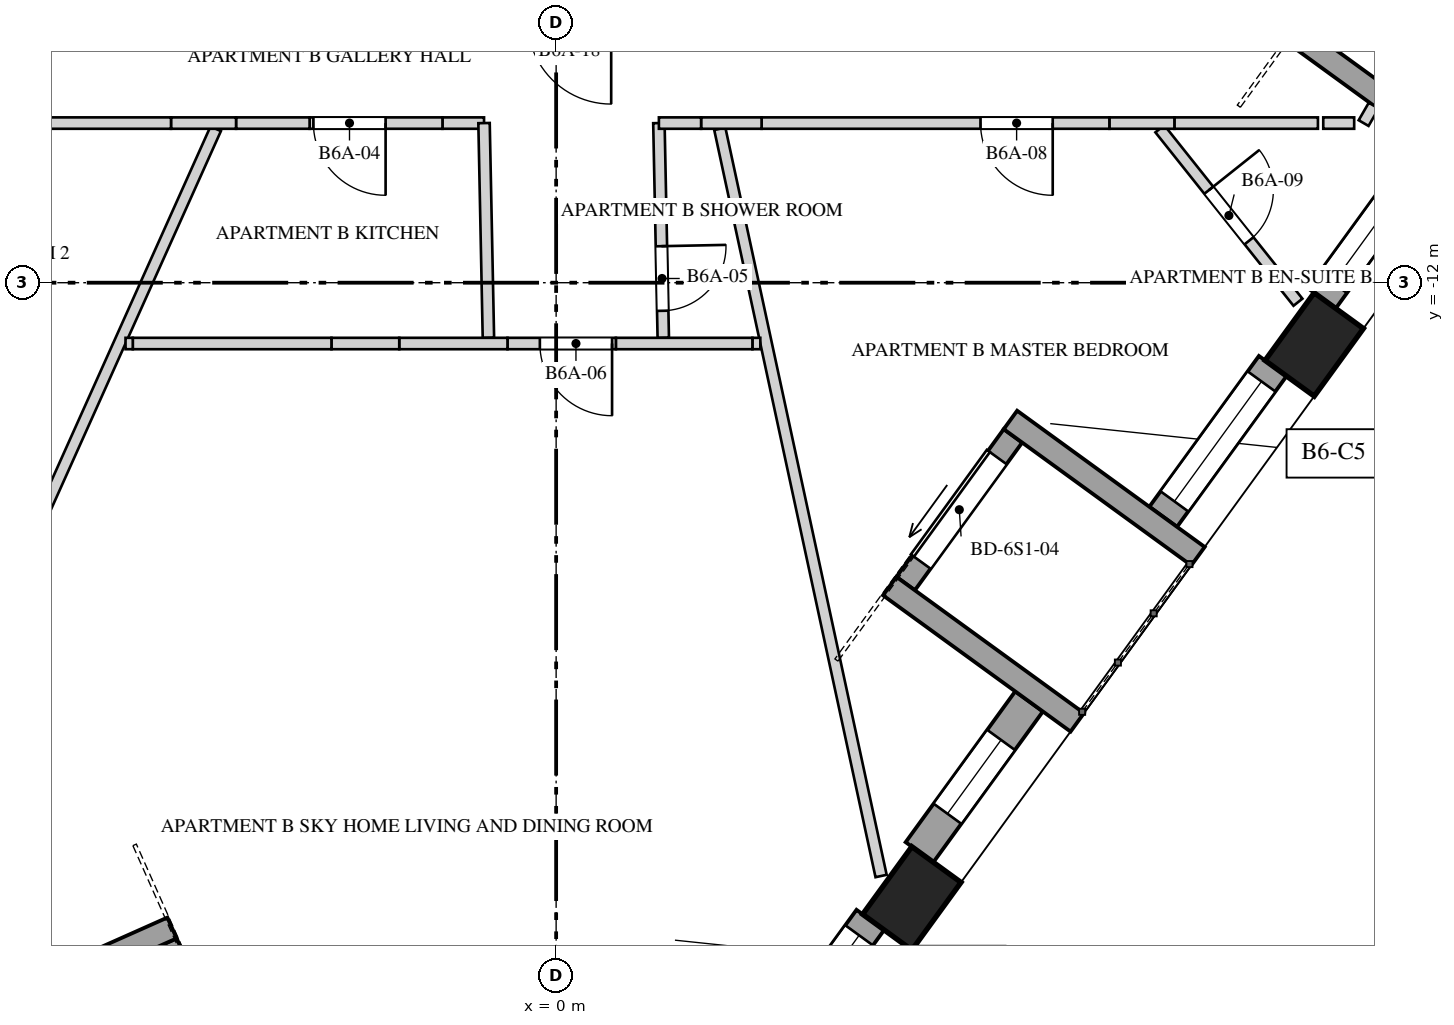
"""IFC4 building model, lengths in metres.
Left out: names, types, materials, properties, quantities, classifications, styles, units other than length and angle.
Written with IfcOpenShell. Run it as: python <this file> out.ifc"""

import sys

from ifc_helpers import new_model, si_unit, direction, frame, frame_2d, origin, origin_2d, place, context, subcontext, project, spatial, polyline, rectangle, outline, extrude, element, fill, save


model = new_model("IFC4")
c1 = context("Model", 3, precision=1e-05, world=origin(), true_north=direction((0.0, 1.0)))
c2 = subcontext(c1, "Body", "Model", "MODEL_VIEW")
j1 = project(units=[si_unit("LENGTHUNIT", "METRE"), si_unit("PLANEANGLEUNIT", "RADIAN")], contexts=[c1])
p1 = place(None, origin())
s1 = spatial("IfcSite", under=j1, at=p1, CompositionType="ELEMENT")
p2 = place(p1, origin())
s2 = spatial("IfcBuilding", under=s1, at=p2, CompositionType="ELEMENT")
p3 = place(p2, frame((0.0, 0.0, 241.2)))
s3 = spatial("IfcBuildingStorey", under=s2, at=p3, CompositionType="ELEMENT", Elevation=241.2)
for number, where, z_axis, x_axis in (
    (1, (4.68, -20.099, 0.0), (0.0, 0.0, 1.0), (0.588, 0.809, 0.0)),
    (2, (9.974, -12.813, 0.0), (0.0, 0.0, 1.0), (0.588, 0.809, 0.0)),
):
    element("IfcColumn", number, at=place(p3, frame(where, z_axis=z_axis, x_axis=x_axis)), inside=s3, PredefinedType="COLUMN", context=c2, shape_type="SweptSolid", body=[
        extrude(rectangle(XDim=1.1, YDim=0.8, at=origin_2d()), origin(), (0.0, 0.0, 1.0), 4.0),
    ])
p4 = place(p3, frame((-0.131, -26.253, 0.0), z_axis=(0.0, 0.0, 1.0), x_axis=(0.587781549195, 0.80901968482, 0.0)))
e3 = element("IfcWall", 3, at=p4, inside=s3, PredefinedType="SOLIDWALL", context=c2, shape_type="SweptSolid", body=[
    extrude(rectangle(XDim=7.257, YDim=0.45, at=frame_2d((3.628, 0.0))), origin(), (0.0, 0.0, 1.0), 3.3),
])
p5 = place(p4, frame((0.301, 0.0, 0.4)))
e4 = element("IfcOpeningElement", 4, at=p5, cuts=e3, PredefinedType="OPENING", context=c2, shape_type="SweptSolid", body=[
    extrude(rectangle(XDim=1.2, YDim=2.1, at=frame_2d((0.6, 1.05))), frame((0.0, 0.235, 0.0), z_axis=(0.0, -1.0, 0.0), x_axis=(1.0, 0.0, 0.0)), (0.0, 0.0, 1.0), 0.47),
])
p6 = place(p4, frame((2.328, 0.0, 0.4)))
e5 = element("IfcOpeningElement", 5, at=p6, cuts=e3, PredefinedType="OPENING", context=c2, shape_type="SweptSolid", body=[
    extrude(rectangle(XDim=1.95, YDim=2.75, at=frame_2d((0.975, 1.375))), frame((0.0, 0.235, 0.0), z_axis=(0.0, -1.0, 0.0), x_axis=(1.0, 0.0, 0.0)), (0.0, 0.0, 1.0), 0.47),
])
p7 = place(p4, frame((5.056, 0.0, 0.4)))
e6 = element("IfcOpeningElement", 6, at=p7, cuts=e3, PredefinedType="OPENING", context=c2, shape_type="SweptSolid", body=[
    extrude(rectangle(XDim=1.95, YDim=2.75, at=frame_2d((0.975, 1.375))), frame((0.0, 0.235, 0.0), z_axis=(0.0, -1.0, 0.0), x_axis=(1.0, 0.0, 0.0)), (0.0, 0.0, 1.0), 0.47),
])
p8 = place(p3, frame((4.781, -19.493, 0.0), z_axis=(0.0, 0.0, 1.0), x_axis=(0.587792773076, 0.809011530152, 0.0)))
e7 = element("IfcWall", 7, at=p8, inside=s3, PredefinedType="SOLIDWALL", context=c2, shape_type="SweptSolid", body=[
    extrude(rectangle(XDim=2.452, YDim=0.45, at=frame_2d((1.226, 0.0))), origin(), (0.0, 0.0, 1.0), 3.3),
])
p9 = place(p8, frame((0.626, 0.0, 0.4)))
e8 = element("IfcOpeningElement", 8, at=p9, cuts=e7, PredefinedType="OPENING", context=c2, shape_type="SweptSolid", body=[
    extrude(rectangle(XDim=1.2, YDim=2.75, at=frame_2d((0.6, 1.375))), frame((0.0, 0.235, 0.0), z_axis=(0.0, -1.0, 0.0), x_axis=(1.0, 0.0, 0.0)), (0.0, 0.0, 1.0), 0.47),
])
p10 = place(p3, frame((7.987, -15.08, 0.0), z_axis=(0.0, 0.0, 1.0), x_axis=(0.587792773076, 0.809011530152, 0.0)))
e9 = element("IfcWall", 9, at=p10, inside=s3, PredefinedType="SOLIDWALL", context=c2, shape_type="SweptSolid", body=[
    extrude(rectangle(XDim=2.452, YDim=0.45, at=frame_2d((1.226, 0.0))), origin(), (0.0, 0.0, 1.0), 3.3),
])
p11 = place(p10, frame((0.251, 0.0, 0.4)))
e10 = element("IfcOpeningElement", 10, at=p11, cuts=e9, PredefinedType="OPENING", context=c2, shape_type="SweptSolid", body=[
    extrude(rectangle(XDim=1.95, YDim=2.75, at=frame_2d((0.975, 1.375))), frame((0.0, 0.235, 0.0), z_axis=(0.0, -1.0, 0.0), x_axis=(1.0, 0.0, 0.0)), (0.0, 0.0, 1.0), 0.47),
])
p12 = place(p3, frame((10.074, -12.206, 0.0), z_axis=(0.0, 0.0, 1.0), x_axis=(0.587792773076, 0.809011530152, 0.0)))
e11 = element("IfcWall", 11, at=p12, inside=s3, PredefinedType="SOLIDWALL", context=c2, shape_type="SweptSolid", body=[
    extrude(rectangle(XDim=2.452, YDim=0.45, at=frame_2d((1.226, 0.0))), origin(), (0.0, 0.0, 1.0), 3.3),
])
p13 = place(p12, frame((0.251, 0.0, 0.4)))
e12 = element("IfcOpeningElement", 12, at=p13, cuts=e11, PredefinedType="OPENING", context=c2, shape_type="SweptSolid", body=[
    extrude(rectangle(XDim=1.95, YDim=2.75, at=frame_2d((0.975, 1.375))), frame((0.0, 0.235, 0.0), z_axis=(0.0, -1.0, 0.0), x_axis=(1.0, 0.0, 0.0)), (0.0, 0.0, 1.0), 0.47),
])
p14 = place(p3, frame((-5.129, -20.687, 0.0), z_axis=(0.0, 0.0, 1.0), x_axis=(0.406723017018, -0.913551524232, 0.0)))
e13 = element("IfcWall", 13, at=p14, inside=s3, PredefinedType="SOLIDWALL", context=c2, shape_type="SweptSolid", body=[
    extrude(rectangle(XDim=2.402, YDim=0.3, at=frame_2d((1.201, 0.0))), origin(), (0.0, 0.0, 1.0), 3.3),
])
p15 = place(p14, frame((0.351, 0.0, 0.0)))
e14 = element("IfcOpeningElement", 14, at=p15, cuts=e13, PredefinedType="OPENING", context=c2, shape_type="SweptSolid", body=[
    extrude(rectangle(XDim=1.7, YDim=2.5, at=frame_2d((0.85, 1.25))), frame((0.0, 0.16, 0.0), z_axis=(0.0, -1.0, 0.0), x_axis=(1.0, 0.0, 0.0)), (0.0, 0.0, 1.0), 0.32),
])
p16 = place(p3, frame((-7.84, -21.729, 0.0), z_axis=(0.0, 0.0, 1.0), x_axis=(0.913557205168, 0.406710256677, 0.0)))
e15 = element("IfcWall", 15, at=p16, inside=s3, PredefinedType="SOLIDWALL", context=c2, shape_type="SweptSolid", body=[
    extrude(rectangle(XDim=3.05, YDim=0.3, at=frame_2d((1.525, 0.0))), origin(), (0.0, 0.0, 1.0), 3.3),
])
p17 = place(p3, frame((4.598, -15.958, 0.0), z_axis=(0.0, 0.0, 1.0), x_axis=(0.587833242688, 0.808982125137, 0.0)))
e16 = element("IfcWall", 16, at=p17, inside=s3, PredefinedType="SOLIDWALL", context=c2, shape_type="SweptSolid", body=[
    extrude(rectangle(XDim=2.402, YDim=0.3, at=frame_2d((1.201, 0.0))), origin(), (0.0, 0.0, 1.0), 3.3),
])
p18 = place(p17, frame((0.351, 0.0, 0.0)))
e17 = element("IfcOpeningElement", 17, at=p18, cuts=e16, PredefinedType="OPENING", context=c2, shape_type="SweptSolid", body=[
    extrude(rectangle(XDim=1.7, YDim=2.5, at=frame_2d((0.85, 1.25))), frame((0.0, 0.16, 0.0), z_axis=(0.0, -1.0, 0.0), x_axis=(1.0, 0.0, 0.0)), (0.0, 0.0, 1.0), 0.32),
])
for number, where, z_axis, x_axis in (
    (18, (6.856, -17.784, 0.0), (0.0, 0.0, 1.0), (-0.809, 0.588, 0.0)),
    (19, (8.444, -15.598, 0.0), (0.0, 0.0, 1.0), (-0.809, 0.588, 0.0)),
    (20, (12.15, -10.498, 0.0), (0.0, 0.0, 1.0), (-0.809, 0.588, 0.0)),
):
    element("IfcWall", number, at=place(p3, frame(where, z_axis=z_axis, x_axis=x_axis)), inside=s3, PredefinedType="SOLIDWALL", context=c2, shape_type="SweptSolid", body=[
        extrude(rectangle(XDim=3.05, YDim=0.3, at=frame_2d((1.525, 0.0))), origin(), (0.0, 0.0, 1.0), 3.3),
    ])
p19 = place(p3, frame((-8.3, -18.484, 0.0), z_axis=(0.0, 0.0, 1.0), x_axis=(0.409625524412, 0.9122537639, 0.0)))
e21 = element("IfcWall", 21, at=p19, inside=s3, PredefinedType="PARTITIONING", context=c2, shape_type="SweptSolid", body=[
    extrude(rectangle(XDim=9.327, YDim=0.15, at=frame_2d((4.664, 0.0))), origin(), (0.0, 0.0, 1.0), 2.75),
])
p20 = place(p3, frame((-0.948, -9.9, 0.0), z_axis=(0.0, 0.0, 1.0), x_axis=(-1.0, 0.0, 0.0)))
e22 = element("IfcWall", 22, at=p20, inside=s3, PredefinedType="PARTITIONING", context=c2, shape_type="SweptSolid", body=[
    extrude(rectangle(XDim=0.547, YDim=0.15, at=frame_2d((0.273, 0.0))), origin(), (0.0, 0.0, 1.0), 3.65),
])
p21 = place(p3, frame((-1.495, -9.9, 0.0), z_axis=(0.0, 0.0, 1.0), x_axis=(-1.0, 0.0, 0.0)))
e23 = element("IfcWall", 23, at=p21, inside=s3, PredefinedType="PARTITIONING", context=c2, shape_type="SweptSolid", body=[
    extrude(outline(polyline([(0.0, 0.0), (1.748, 0.0), (1.748, 3.65), (0.892, 3.65), (0.892, 2.55), (0.0, 2.55), (0.0, 0.0)])), frame((0.0, 0.075, 0.0), z_axis=(0.0, -1.0, 0.0), x_axis=(1.0, 0.0, 0.0)), (0.0, 0.0, 1.0), 0.15),
])
p22 = place(p21, frame((0.748, 0.0, 0.0)))
e24 = element("IfcOpeningElement", 24, at=p22, cuts=e23, PredefinedType="OPENING", context=c2, shape_type="SweptSolid", body=[
    extrude(rectangle(XDim=0.95, YDim=2.4, at=frame_2d((0.475, 1.2))), frame((0.0, 0.085, 0.0), z_axis=(0.0, -1.0, 0.0), x_axis=(1.0, 0.0, 0.0)), (0.0, 0.0, 1.0), 0.17),
])
p23 = place(p3, frame((-3.244, -9.9, 0.0), z_axis=(0.0, 0.0, 1.0), x_axis=(-1.0, 0.0, 0.0)))
e25 = element("IfcWall", 25, at=p23, inside=s3, PredefinedType="PARTITIONING", context=c2, shape_type="SweptSolid", body=[
    extrude(rectangle(XDim=0.967, YDim=0.15, at=frame_2d((0.484, 0.0))), origin(), (0.0, 0.0, 1.0), 3.65),
])
p24 = place(p3, frame((-4.211, -9.9, 0.0), z_axis=(0.0, 0.0, 1.0), x_axis=(-1.0, 0.0, 0.0)))
e26 = element("IfcWall", 26, at=p24, inside=s3, PredefinedType="PARTITIONING", context=c2, shape_type="SweptSolid", body=[
    extrude(rectangle(XDim=0.856, YDim=0.15, at=frame_2d((0.428, 0.0))), origin(), (0.0, 0.0, 1.0), 2.75),
])
p25 = place(p3, frame((-5.067, -9.9, 0.0), z_axis=(0.0, 0.0, 1.0), x_axis=(-1.0, 0.0, 0.0)))
e27 = element("IfcWall", 27, at=p25, inside=s3, PredefinedType="PARTITIONING", context=c2, shape_type="SweptSolid", body=[
    extrude(rectangle(XDim=5.556, YDim=0.15, at=frame_2d((2.778, 0.0))), origin(), (0.0, 0.0, 1.0), 3.65),
])
p26 = place(p25, frame((1.971, 0.0, 0.0)))
e28 = element("IfcOpeningElement", 28, at=p26, cuts=e27, PredefinedType="OPENING", context=c2, shape_type="SweptSolid", body=[
    extrude(rectangle(XDim=0.95, YDim=2.4, at=frame_2d((0.475, 1.2))), frame((0.0, 0.085, 0.0), z_axis=(0.0, -1.0, 0.0), x_axis=(1.0, 0.0, 0.0)), (0.0, 0.0, 1.0), 0.17),
])
p27 = place(p3, frame((-0.891, -12.725, 0.0), z_axis=(0.0, 0.0, 1.0), x_axis=(-0.020389814815, 0.999792106116, 0.0)))
e29 = element("IfcWall", 29, at=p27, inside=s3, PredefinedType="PARTITIONING", context=c2, shape_type="SweptSolid", body=[
    extrude(rectangle(XDim=2.826, YDim=0.15, at=frame_2d((1.413, 0.0))), origin(), (0.0, 0.0, 1.0), 3.65),
])
p28 = place(p3, frame((1.352, -9.9, 0.0), z_axis=(0.0, 0.0, 1.0), x_axis=(0.020303452986, -0.999793863652, 0.0)))
e30 = element("IfcWall", 30, at=p28, inside=s3, PredefinedType="PARTITIONING", context=c2, shape_type="SweptSolid", body=[
    extrude(rectangle(XDim=2.826, YDim=0.15, at=frame_2d((1.413, 0.0))), origin(), (0.0, 0.0, 1.0), 3.65),
])
p29 = place(p28, frame((1.62, 0.0, 0.0)))
e31 = element("IfcOpeningElement", 31, at=p29, cuts=e30, PredefinedType="OPENING", context=c2, shape_type="SweptSolid", body=[
    extrude(rectangle(XDim=0.85, YDim=2.4, at=frame_2d((0.425, 1.2))), frame((0.0, 0.085, 0.0), z_axis=(0.0, -1.0, 0.0), x_axis=(1.0, 0.0, 0.0)), (0.0, 0.0, 1.0), 0.17),
])
p30 = place(p3, frame((2.153, -9.975, 0.0), z_axis=(0.0, 0.0, 1.0), x_axis=(0.210986150263, -0.977489050781, 0.0)))
e32 = element("IfcWall", 32, at=p30, inside=s3, PredefinedType="PARTITIONING", context=c2, shape_type="SweptSolid", body=[
    extrude(rectangle(XDim=10.057, YDim=0.15, at=frame_2d((5.028, 0.0))), origin(), (0.0, 0.0, 1.0), 2.75),
])
p31 = place(p3, frame((2.686, -12.8, 0.0), z_axis=(0.0, 0.0, 1.0), x_axis=(-1.0, 0.0, 0.0)))
e33 = element("IfcWall", 33, at=p31, inside=s3, PredefinedType="PARTITIONING", context=c2, shape_type="SweptSolid", body=[
    extrude(rectangle(XDim=0.104, YDim=0.15, at=frame_2d((0.052, 0.0))), origin(), (0.0, 0.0, 1.0), 2.75),
])
p32 = place(p3, frame((2.582, -12.8, 0.0), z_axis=(0.0, 0.0, 1.0), x_axis=(-1.0, 0.0, 0.0)))
e34 = element("IfcWall", 34, at=p32, inside=s3, PredefinedType="PARTITIONING", context=c2, shape_type="SweptSolid", body=[
    extrude(rectangle(XDim=1.796, YDim=0.15, at=frame_2d((0.898, 0.0))), origin(), (0.0, 0.0, 1.0), 3.65),
])
p33 = place(p3, frame((0.786, -12.8, 0.0), z_axis=(0.0, 0.0, 1.0), x_axis=(-1.0, 0.0, 0.0)))
e35 = element("IfcWall", 35, at=p33, inside=s3, PredefinedType="PARTITIONING", context=c2, shape_type="SweptSolid", body=[
    extrude(outline(polyline([(0.0, 0.0), (1.426, 0.0), (1.426, 2.55), (0.551, 2.55), (0.551, 3.65), (0.0, 3.65), (0.0, 0.0)])), frame((0.0, 0.075, 0.0), z_axis=(0.0, -1.0, 0.0), x_axis=(1.0, 0.0, 0.0)), (0.0, 0.0, 1.0), 0.15),
])
p34 = place(p33, frame((0.05, 0.0, 0.0)))
e36 = element("IfcOpeningElement", 36, at=p34, cuts=e35, PredefinedType="OPENING", context=c2, shape_type="SweptSolid", body=[
    extrude(rectangle(XDim=0.95, YDim=2.4, at=frame_2d((0.475, 1.2))), frame((0.0, 0.085, 0.0), z_axis=(0.0, -1.0, 0.0), x_axis=(1.0, 0.0, 0.0)), (0.0, 0.0, 1.0), 0.17),
])
p35 = place(p3, frame((-0.64, -12.8, 0.0), z_axis=(0.0, 0.0, 1.0), x_axis=(-1.0, 0.0, 0.0)))
e37 = element("IfcWall", 37, at=p35, inside=s3, PredefinedType="PARTITIONING", context=c2, shape_type="SweptSolid", body=[
    extrude(rectangle(XDim=1.424, YDim=0.15, at=frame_2d((0.712, 0.0))), origin(), (0.0, 0.0, 1.0), 3.65),
])
p36 = place(p3, frame((-2.064, -12.8, 0.0), z_axis=(0.0, 0.0, 1.0), x_axis=(-1.0, 0.0, 0.0)))
e38 = element("IfcWall", 38, at=p36, inside=s3, PredefinedType="PARTITIONING", context=c2, shape_type="SweptSolid", body=[
    extrude(rectangle(XDim=0.892, YDim=0.15, at=frame_2d((0.446, 0.0))), origin(), (0.0, 0.0, 1.0), 2.55),
])
p37 = place(p3, frame((-2.956, -12.8, 0.0), z_axis=(0.0, 0.0, 1.0), x_axis=(-1.0, 0.0, 0.0)))
e39 = element("IfcWall", 39, at=p37, inside=s3, PredefinedType="PARTITIONING", context=c2, shape_type="SweptSolid", body=[
    extrude(rectangle(XDim=2.614, YDim=0.15, at=frame_2d((1.307, 0.0))), origin(), (0.0, 0.0, 1.0), 3.65),
])
p38 = place(p3, frame((-5.57, -12.8, 0.0), z_axis=(0.0, 0.0, 1.0), x_axis=(-1.0, 0.0, 0.0)))
e40 = element("IfcWall", 40, at=p38, inside=s3, PredefinedType="PARTITIONING", context=c2, shape_type="SweptSolid", body=[
    extrude(rectangle(XDim=0.095, YDim=0.15, at=frame_2d((0.048, 0.0))), origin(), (0.0, 0.0, 1.0), 2.75),
])
p39 = place(p3, frame((7.943, -9.975, 0.0), z_axis=(0.0, 0.0, 1.0), x_axis=(0.622917295976, -0.782287697956, 0.0)))
e41 = element("IfcWall", 41, at=p39, inside=s3, PredefinedType="PARTITIONING", context=c2, shape_type="SweptSolid", body=[
    extrude(rectangle(XDim=2.917, YDim=0.15, at=frame_2d((1.458, 0.0))), origin(), (0.0, 0.0, 1.0), 2.95),
])
p40 = place(p39, frame((1.033, 0.0, 0.0)))
e42 = element("IfcOpeningElement", 42, at=p40, cuts=e41, PredefinedType="OPENING", context=c2, shape_type="SweptSolid", body=[
    extrude(rectangle(XDim=0.85, YDim=2.4, at=frame_2d((0.425, 1.2))), frame((0.0, 0.085, 0.0), z_axis=(0.0, -1.0, 0.0), x_axis=(1.0, 0.0, 0.0)), (0.0, 0.0, 1.0), 0.17),
])
p41 = place(p3, frame((10.022, -9.9, 0.0), z_axis=(0.0, 0.0, 1.0), x_axis=(-1.0, 0.0, 0.0)))
e43 = element("IfcWall", 43, at=p41, inside=s3, PredefinedType="PARTITIONING", context=c2, shape_type="SweptSolid", body=[
    extrude(rectangle(XDim=1.888, YDim=0.15, at=frame_2d((0.944, 0.0))), origin(), (0.0, 0.0, 1.0), 3.65),
])
p42 = place(p3, frame((8.134, -9.9, 0.0), z_axis=(0.0, 0.0, 1.0), x_axis=(-1.0, 0.0, 0.0)))
e44 = element("IfcWall", 44, at=p42, inside=s3, PredefinedType="PARTITIONING", context=c2, shape_type="SweptSolid", body=[
    extrude(rectangle(XDim=0.855, YDim=0.15, at=frame_2d((0.428, 0.0))), origin(), (0.0, 0.0, 1.0), 2.95),
])
p43 = place(p3, frame((7.279, -9.9, 0.0), z_axis=(0.0, 0.0, 1.0), x_axis=(-1.0, 0.0, 0.0)))
e45 = element("IfcWall", 45, at=p43, inside=s3, PredefinedType="PARTITIONING", context=c2, shape_type="SweptSolid", body=[
    extrude(rectangle(XDim=4.576, YDim=0.15, at=frame_2d((2.288, 0.0))), origin(), (0.0, 0.0, 1.0), 3.65),
])
p44 = place(p43, frame((0.745, 0.0, 0.0)))
e46 = element("IfcOpeningElement", 46, at=p44, cuts=e45, PredefinedType="OPENING", context=c2, shape_type="SweptSolid", body=[
    extrude(rectangle(XDim=0.95, YDim=2.4, at=frame_2d((0.475, 1.2))), frame((0.0, 0.085, 0.0), z_axis=(0.0, -1.0, 0.0), x_axis=(1.0, 0.0, 0.0)), (0.0, 0.0, 1.0), 0.17),
])
p45 = place(p3, frame((2.703, -9.9, 0.0), z_axis=(0.0, 0.0, 1.0), x_axis=(-1.0, 0.0, 0.0)))
e47 = element("IfcWall", 47, at=p45, inside=s3, PredefinedType="PARTITIONING", context=c2, shape_type="SweptSolid", body=[
    extrude(rectangle(XDim=0.796, YDim=0.15, at=frame_2d((0.398, 0.0))), origin(), (0.0, 0.0, 1.0), 2.75),
])
p46 = place(p3, frame((1.907, -9.9, 0.0), z_axis=(0.0, 0.0, 1.0), x_axis=(-1.0, 0.0, 0.0)))
e48 = element("IfcWall", 48, at=p46, inside=s3, PredefinedType="PARTITIONING", context=c2, shape_type="SweptSolid", body=[
    extrude(rectangle(XDim=0.555, YDim=0.15, at=frame_2d((0.278, 0.0))), origin(), (0.0, 0.0, 1.0), 3.65),
])
p47 = place(p3, frame((10.092, -9.9, 0.0), z_axis=(0.0, 0.0, 1.0), x_axis=(1.0, 0.0, 0.0)))
e49 = element("IfcWall", 49, at=p47, inside=s3, PredefinedType="PARTITIONING", context=c2, shape_type="SweptSolid", body=[
    extrude(rectangle(XDim=0.407, YDim=0.15, at=frame_2d((0.204, 0.0))), origin(), (0.0, 0.0, 1.0), 3.65),
])
p48 = place(p3, frame((10.756, -9.67, 0.0), z_axis=(0.0, 0.0, 1.0), x_axis=(-0.499802134818, -0.866139611167, 0.0)))
e50 = element("IfcWall", 50, at=p48, inside=s3, PredefinedType="PARTITIONING", context=c2, shape_type="SweptSolid", body=[
    extrude(rectangle(XDim=0.265, YDim=0.15, at=frame_2d((0.133, 0.0))), origin(), (0.0, 0.0, 1.0), 3.65),
])
p49 = place(p7, origin())
e51 = element("IfcWindow", 51, at=p49, inside=s3, PartitioningType="SINGLE_PANEL", PredefinedType="WINDOW", context=c2, shape_type="SweptSolid", body=[
    extrude(rectangle(XDim=1.95, YDim=2.75, at=frame_2d((0.975, 1.375))), frame((0.0, 0.03, 0.0), z_axis=(0.0, -1.0, 0.0), x_axis=(1.0, 0.0, 0.0)), (0.0, 0.0, 1.0), 0.06),
])
fill(e6, e51)
p50 = place(p9, origin())
e52 = element("IfcWindow", 52, at=p50, inside=s3, PartitioningType="SINGLE_PANEL", PredefinedType="WINDOW", context=c2, shape_type="SweptSolid", body=[
    extrude(rectangle(XDim=1.2, YDim=2.75, at=frame_2d((0.6, 1.375))), frame((0.0, 0.03, 0.0), z_axis=(0.0, -1.0, 0.0), x_axis=(1.0, 0.0, 0.0)), (0.0, 0.0, 1.0), 0.06),
])
fill(e8, e52)
p51 = place(p11, origin())
e53 = element("IfcWindow", 53, at=p51, inside=s3, PartitioningType="SINGLE_PANEL", PredefinedType="WINDOW", context=c2, shape_type="SweptSolid", body=[
    extrude(rectangle(XDim=1.95, YDim=2.75, at=frame_2d((0.975, 1.375))), frame((0.0, 0.03, 0.0), z_axis=(0.0, -1.0, 0.0), x_axis=(1.0, 0.0, 0.0)), (0.0, 0.0, 1.0), 0.06),
])
fill(e10, e53)
p52 = place(p13, origin())
e54 = element("IfcWindow", 54, at=p52, inside=s3, PartitioningType="SINGLE_PANEL", PredefinedType="WINDOW", context=c2, shape_type="SweptSolid", body=[
    extrude(rectangle(XDim=1.95, YDim=2.75, at=frame_2d((0.975, 1.375))), frame((0.0, 0.03, 0.0), z_axis=(0.0, -1.0, 0.0), x_axis=(1.0, 0.0, 0.0)), (0.0, 0.0, 1.0), 0.06),
])
fill(e12, e54)
p53 = place(p18, origin())
e55 = element("IfcDoor", 55, at=p53, inside=s3, OperationType="SLIDING_TO_LEFT", PredefinedType="DOOR", context=c2, shape_type="SweptSolid", body=[
    extrude(rectangle(XDim=1.7, YDim=2.5, at=frame_2d((0.85, 1.25))), frame((0.0, 0.025, 0.0), z_axis=(0.0, -1.0, 0.0), x_axis=(1.0, 0.0, 0.0)), (0.0, 0.0, 1.0), 0.05),
])
fill(e17, e55)
p54 = place(p22, origin())
e56 = element("IfcDoor", 56, at=p54, inside=s3, OperationType="SINGLE_SWING_RIGHT", PredefinedType="DOOR", context=c2, shape_type="SweptSolid", body=[
    extrude(rectangle(XDim=0.95, YDim=2.4, at=frame_2d((0.475, 1.2))), frame((0.0, 0.025, 0.0), z_axis=(0.0, -1.0, 0.0), x_axis=(1.0, 0.0, 0.0)), (0.0, 0.0, 1.0), 0.05),
])
fill(e24, e56)
p55 = place(p29, origin())
e57 = element("IfcDoor", 57, at=p55, inside=s3, OperationType="SINGLE_SWING_LEFT", PredefinedType="DOOR", context=c2, shape_type="SweptSolid", body=[
    extrude(rectangle(XDim=0.85, YDim=2.4, at=frame_2d((0.425, 1.2))), frame((0.0, 0.025, 0.0), z_axis=(0.0, -1.0, 0.0), x_axis=(1.0, 0.0, 0.0)), (0.0, 0.0, 1.0), 0.05),
])
fill(e31, e57)
p56 = place(p34, origin())
e58 = element("IfcDoor", 58, at=p56, inside=s3, OperationType="SINGLE_SWING_RIGHT", PredefinedType="DOOR", context=c2, shape_type="SweptSolid", body=[
    extrude(rectangle(XDim=0.95, YDim=2.4, at=frame_2d((0.475, 1.2))), frame((0.0, 0.025, 0.0), z_axis=(0.0, -1.0, 0.0), x_axis=(1.0, 0.0, 0.0)), (0.0, 0.0, 1.0), 0.05),
])
fill(e36, e58)
p57 = place(p44, origin())
e59 = element("IfcDoor", 59, at=p57, inside=s3, OperationType="SINGLE_SWING_RIGHT", PredefinedType="DOOR", context=c2, shape_type="SweptSolid", body=[
    extrude(rectangle(XDim=0.95, YDim=2.4, at=frame_2d((0.475, 1.2))), frame((0.0, 0.025, 0.0), z_axis=(0.0, -1.0, 0.0), x_axis=(1.0, 0.0, 0.0)), (0.0, 0.0, 1.0), 0.05),
])
fill(e46, e59)
p58 = place(p40, origin())
e60 = element("IfcDoor", 60, at=p58, inside=s3, OperationType="SINGLE_SWING_LEFT", PredefinedType="DOOR", context=c2, shape_type="SweptSolid", body=[
    extrude(rectangle(XDim=0.85, YDim=2.4, at=frame_2d((0.425, 1.2))), frame((0.0, 0.025, 0.0), z_axis=(0.0, -1.0, 0.0), x_axis=(1.0, 0.0, 0.0)), (0.0, 0.0, 1.0), 0.05),
])
fill(e42, e60)
save(model, sys.argv[1])
